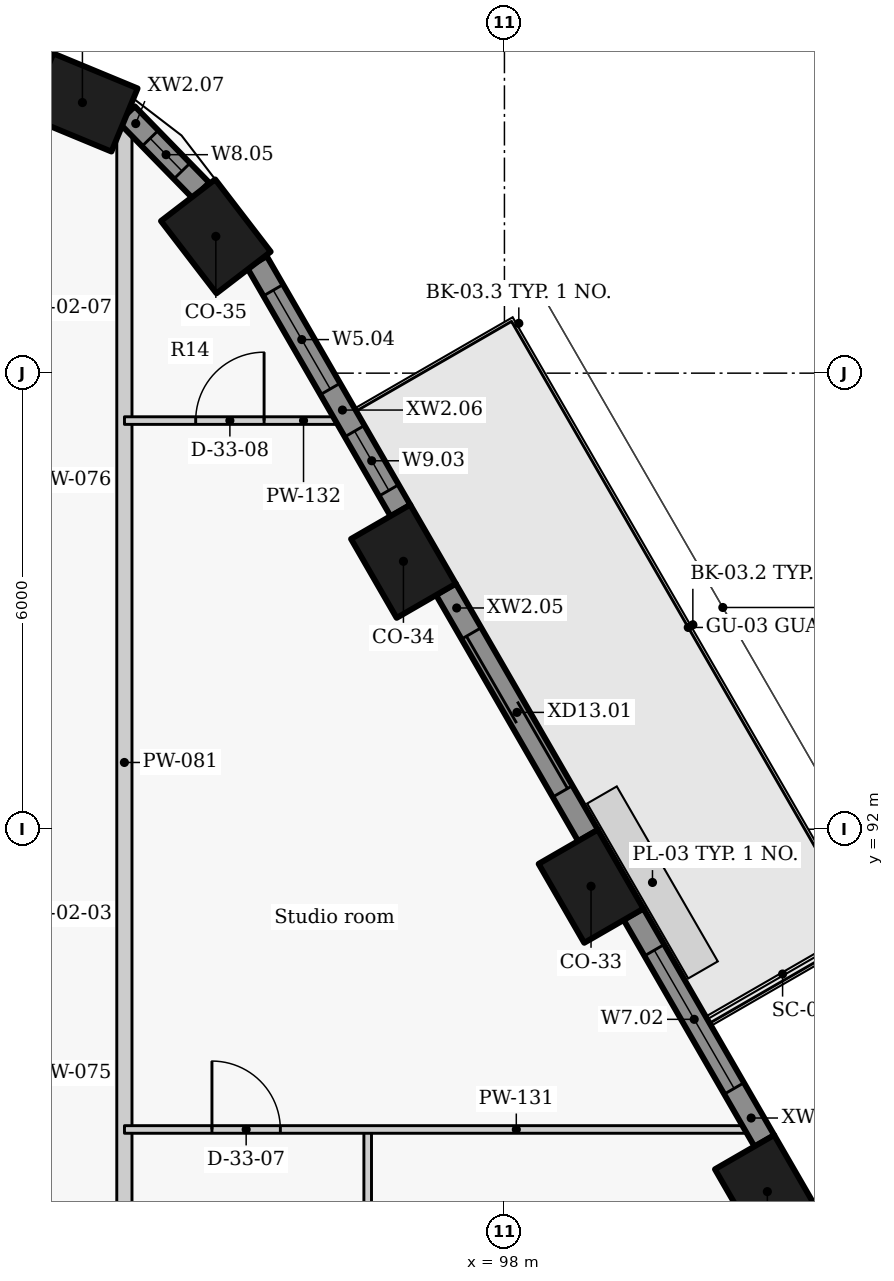
"""IFC4 building model, lengths in metres.
Left out: names, types, materials, properties, quantities, classifications, styles, units other than length and angle.
Written with IfcOpenShell. Run it as: python <this file> out.ifc"""

import sys

from ifc_helpers import new_model, si_unit, direction, frame, frame_2d, origin, origin_2d, place, context, subcontext, project, spatial, rectangle, extrude, element, fill, save


model = new_model("IFC4")
c1 = context("Model", 3, precision=1e-05, world=origin(), true_north=direction((0.0, 1.0)))
c2 = subcontext(c1, "Body", "Model", "MODEL_VIEW")
j1 = project(units=[si_unit("LENGTHUNIT", "METRE"), si_unit("PLANEANGLEUNIT", "RADIAN")], contexts=[c1])
p1 = place(None, origin())
s1 = spatial("IfcSite", under=j1, at=p1, CompositionType="ELEMENT")
p2 = place(p1, origin())
s2 = spatial("IfcBuilding", under=s1, at=p2, CompositionType="ELEMENT")
p3 = place(p2, frame((0.0, 0.0, 180.0)))
s3 = spatial("IfcBuildingStorey", under=s2, at=p3, CompositionType="ELEMENT", Elevation=180.0)
for number, where, z_axis, x_axis in (
    (1, (101.459, 87.232, 0.0), (0.0, 0.0, 1.0), (-0.5, 0.866, 0.0)),
    (2, (99.139, 91.25, 0.0), (0.0, 0.0, 1.0), (-0.5, 0.866, 0.0)),
    (3, (96.671, 95.525, 0.0), (0.0, 0.0, 1.0), (-0.5, 0.866, 0.0)),
    (4, (94.203, 99.8, 0.0), (0.0, 0.0, 1.0), (-0.609, 0.793, 0.0)),
    (5, (92.448, 101.56, 0.0), (0.0, 0.0, 1.0), (-0.924, 0.383, 0.0)),
):
    element("IfcColumn", number, at=place(p3, frame(where, z_axis=z_axis, x_axis=x_axis)), inside=s3, PredefinedType="COLUMN", context=c2, shape_type="SweptSolid", body=[
        extrude(rectangle(XDim=1.2, YDim=0.9, at=origin_2d()), origin(), (0.0, 0.0, 1.0), 3.3),
    ])
p4 = place(p3, frame((101.421, 87.898, 0.0), z_axis=(0.0, 0.0, 1.0), x_axis=(-0.499955427682, 0.866051136095, 0.0)))
e6 = element("IfcWall", 6, at=p4, inside=s3, PredefinedType="SOLIDWALL", context=c2, shape_type="SweptSolid", body=[
    extrude(rectangle(XDim=3.447, YDim=0.3, at=frame_2d((1.724, 0.0))), origin(), (0.0, 0.0, 1.0), 2.425),
])
p5 = place(p4, frame((0.798, 0.0, 0.9)))
e7 = element("IfcOpeningElement", 7, at=p5, cuts=e6, PredefinedType="OPENING", context=c2, shape_type="SweptSolid", body=[
    extrude(rectangle(XDim=2.1, YDim=1.1, at=frame_2d((1.05, 0.55))), frame((0.0, 0.16, 0.0), z_axis=(0.0, -1.0, 0.0), x_axis=(1.0, 0.0, 0.0)), (0.0, 0.0, 1.0), 0.32),
])
p6 = place(p3, frame((99.101, 91.916, 0.0), z_axis=(0.0, 0.0, 1.0), x_axis=(-0.500059225181, 0.86599120741, 0.0)))
e8 = element("IfcWall", 8, at=p6, inside=s3, PredefinedType="SOLIDWALL", context=c2, shape_type="SweptSolid", body=[
    extrude(rectangle(XDim=3.744, YDim=0.3, at=frame_2d((1.872, 0.0))), origin(), (0.0, 0.0, 1.0), 2.425),
])
p7 = place(p6, frame((0.672, 0.0, 0.0)))
e9 = element("IfcOpeningElement", 9, at=p7, cuts=e8, PredefinedType="OPENING", context=c2, shape_type="SweptSolid", body=[
    extrude(rectangle(XDim=2.4, YDim=2.0, at=frame_2d((1.2, 1.0))), frame((0.0, 0.16, 0.0), z_axis=(0.0, -1.0, 0.0), x_axis=(1.0, 0.0, 0.0)), (0.0, 0.0, 1.0), 0.32),
])
p8 = place(p3, frame((96.633, 96.191, 0.0), z_axis=(0.0, 0.0, 1.0), x_axis=(-0.499961087031, 0.866047869032, 0.0)))
e10 = element("IfcWall", 10, at=p8, inside=s3, PredefinedType="SOLIDWALL", context=c2, shape_type="SweptSolid", body=[
    extrude(rectangle(XDim=3.779, YDim=0.3, at=frame_2d((1.889, 0.0))), origin(), (0.0, 0.0, 1.0), 2.425),
])
p9 = place(p8, frame((0.308, 0.0, 0.9)))
e11 = element("IfcOpeningElement", 11, at=p9, cuts=e10, PredefinedType="OPENING", context=c2, shape_type="SweptSolid", body=[
    extrude(rectangle(XDim=0.9, YDim=1.1, at=frame_2d((0.45, 0.55))), frame((0.0, 0.16, 0.0), z_axis=(0.0, -1.0, 0.0), x_axis=(1.0, 0.0, 0.0)), (0.0, 0.0, 1.0), 0.32),
])
p10 = place(p8, frame((1.849, 0.0, 0.9)))
e12 = element("IfcOpeningElement", 12, at=p10, cuts=e10, PredefinedType="OPENING", context=c2, shape_type="SweptSolid", body=[
    extrude(rectangle(XDim=1.5, YDim=1.1, at=frame_2d((0.75, 0.55))), frame((0.0, 0.16, 0.0), z_axis=(0.0, -1.0, 0.0), x_axis=(1.0, 0.0, 0.0)), (0.0, 0.0, 1.0), 0.32),
])
p11 = place(p3, frame((94.009, 100.402, 0.0), z_axis=(0.0, 0.0, 1.0), x_axis=(-0.69817596362, 0.715926199984, 0.0)))
e13 = element("IfcWall", 13, at=p11, inside=s3, PredefinedType="SOLIDWALL", context=c2, shape_type="SweptSolid", body=[
    extrude(rectangle(XDim=1.403, YDim=0.3, at=frame_2d((0.701, 0.0))), origin(), (0.0, 0.0, 1.0), 2.425),
])
p12 = place(p11, frame((0.36, 0.0, 0.9)))
e14 = element("IfcOpeningElement", 14, at=p12, cuts=e13, PredefinedType="OPENING", context=c2, shape_type="SweptSolid", body=[
    extrude(rectangle(XDim=0.6, YDim=1.1, at=frame_2d((0.3, 0.55))), frame((0.0, 0.16, 0.0), z_axis=(0.0, -1.0, 0.0), x_axis=(1.0, 0.0, 0.0)), (0.0, 0.0, 1.0), 0.32),
])
p13 = place(p3, frame((93.0, 101.281, 0.0), z_axis=(0.0, 0.0, 1.0), x_axis=(0.0, -1.0, 0.0)))
e15 = element("IfcWall", 15, at=p13, inside=s3, PredefinedType="PARTITIONING", context=c2, shape_type="SweptSolid", body=[
    extrude(rectangle(XDim=42.606, YDim=0.2, at=frame_2d((21.303, 0.0))), origin(), (0.0, 0.0, 1.0), 2.405),
])
p14 = place(p13, frame((39.33, 0.0, 0.0)))
e16 = element("IfcOpeningElement", 16, at=p14, cuts=e15, PredefinedType="OPENING", context=c2, shape_type="SweptSolid", body=[
    extrude(rectangle(XDim=1.0, YDim=2.1, at=frame_2d((0.5, 1.05))), frame((0.0, 0.11, 0.0), z_axis=(0.0, -1.0, 0.0), x_axis=(1.0, 0.0, 0.0)), (0.0, 0.0, 1.0), 0.22),
])
p15 = place(p13, frame((28.005, 0.0, 0.0)))
e17 = element("IfcOpeningElement", 17, at=p15, cuts=e15, PredefinedType="OPENING", context=c2, shape_type="SweptSolid", body=[
    extrude(rectangle(XDim=1.0, YDim=2.1, at=frame_2d((0.5, 1.05))), frame((0.0, 0.11, 0.0), z_axis=(0.0, -1.0, 0.0), x_axis=(1.0, 0.0, 0.0)), (0.0, 0.0, 1.0), 0.22),
])
p16 = place(p13, frame((16.905, 0.0, 0.0)))
e18 = element("IfcOpeningElement", 18, at=p16, cuts=e15, PredefinedType="OPENING", context=c2, shape_type="SweptSolid", body=[
    extrude(rectangle(XDim=1.0, YDim=2.1, at=frame_2d((0.5, 1.05))), frame((0.0, 0.11, 0.0), z_axis=(0.0, -1.0, 0.0), x_axis=(1.0, 0.0, 0.0)), (0.0, 0.0, 1.0), 0.22),
])
p17 = place(p3, frame((96.201, 84.65, 0.0), z_axis=(0.0, 0.0, 1.0), x_axis=(0.0, 1.0, 0.0)))
e19 = element("IfcWall", 19, at=p17, inside=s3, PredefinedType="PARTITIONING", context=c2, shape_type="SweptSolid", body=[
    extrude(rectangle(XDim=3.4, YDim=0.1, at=frame_2d((1.7, 0.0))), origin(), (0.0, 0.0, 1.0), 3.025),
])
p18 = place(p3, frame((93.001, 88.05, 0.0), z_axis=(0.0, 0.0, 1.0), x_axis=(1.0, 0.0, 0.0)))
e20 = element("IfcWall", 20, at=p18, inside=s3, PredefinedType="PARTITIONING", context=c2, shape_type="SweptSolid", body=[
    extrude(rectangle(XDim=8.159, YDim=0.1, at=frame_2d((4.08, 0.0))), origin(), (0.0, 0.0, 1.0), 2.405),
])
p19 = place(p18, frame((1.151, 0.0, 0.0)))
e21 = element("IfcOpeningElement", 21, at=p19, cuts=e20, PredefinedType="OPENING", context=c2, shape_type="SweptSolid", body=[
    extrude(rectangle(XDim=0.9, YDim=2.1, at=frame_2d((0.45, 1.05))), frame((0.0, 0.06, 0.0), z_axis=(0.0, -1.0, 0.0), x_axis=(1.0, 0.0, 0.0)), (0.0, 0.0, 1.0), 0.12),
])
p20 = place(p3, frame((93.001, 97.376, 0.0), z_axis=(0.0, 0.0, 1.0), x_axis=(1.0, 0.0, 0.0)))
e22 = element("IfcWall", 22, at=p20, inside=s3, PredefinedType="PARTITIONING", context=c2, shape_type="SweptSolid", body=[
    extrude(rectangle(XDim=2.775, YDim=0.1, at=frame_2d((1.387, 0.0))), origin(), (0.0, 0.0, 1.0), 2.405),
])
p21 = place(p20, frame((0.937, 0.0, 0.0)))
e23 = element("IfcOpeningElement", 23, at=p21, cuts=e22, PredefinedType="OPENING", context=c2, shape_type="SweptSolid", body=[
    extrude(rectangle(XDim=0.9, YDim=2.1, at=frame_2d((0.45, 1.05))), frame((0.0, 0.06, 0.0), z_axis=(0.0, -1.0, 0.0), x_axis=(1.0, 0.0, 0.0)), (0.0, 0.0, 1.0), 0.12),
])
p22 = place(p5, origin())
e24 = element("IfcWindow", 24, at=p22, inside=s3, PartitioningType="SINGLE_PANEL", PredefinedType="WINDOW", context=c2, shape_type="SweptSolid", body=[
    extrude(rectangle(XDim=2.1, YDim=1.1, at=frame_2d((1.05, 0.55))), frame((0.0, 0.03, 0.0), z_axis=(0.0, -1.0, 0.0), x_axis=(1.0, 0.0, 0.0)), (0.0, 0.0, 1.0), 0.06),
])
fill(e7, e24)
p23 = place(p7, origin())
e25 = element("IfcDoor", 25, at=p23, inside=s3, OperationType="DOUBLE_DOOR_SLIDING", PredefinedType="DOOR", context=c2, shape_type="SweptSolid", body=[
    extrude(rectangle(XDim=2.4, YDim=2.0, at=frame_2d((1.2, 1.0))), frame((0.0, 0.025, 0.0), z_axis=(0.0, -1.0, 0.0), x_axis=(1.0, 0.0, 0.0)), (0.0, 0.0, 1.0), 0.05),
])
fill(e9, e25)
p24 = place(p9, origin())
e26 = element("IfcWindow", 26, at=p24, inside=s3, PartitioningType="SINGLE_PANEL", PredefinedType="WINDOW", context=c2, shape_type="SweptSolid", body=[
    extrude(rectangle(XDim=0.9, YDim=1.1, at=frame_2d((0.45, 0.55))), frame((0.0, 0.03, 0.0), z_axis=(0.0, -1.0, 0.0), x_axis=(1.0, 0.0, 0.0)), (0.0, 0.0, 1.0), 0.06),
])
fill(e11, e26)
p25 = place(p10, origin())
e27 = element("IfcWindow", 27, at=p25, inside=s3, PartitioningType="SINGLE_PANEL", PredefinedType="WINDOW", context=c2, shape_type="SweptSolid", body=[
    extrude(rectangle(XDim=1.5, YDim=1.1, at=frame_2d((0.75, 0.55))), frame((0.0, 0.03, 0.0), z_axis=(0.0, -1.0, 0.0), x_axis=(1.0, 0.0, 0.0)), (0.0, 0.0, 1.0), 0.06),
])
fill(e12, e27)
p26 = place(p12, origin())
e28 = element("IfcWindow", 28, at=p26, inside=s3, PartitioningType="SINGLE_PANEL", PredefinedType="WINDOW", context=c2, shape_type="SweptSolid", body=[
    extrude(rectangle(XDim=0.6, YDim=1.1, at=frame_2d((0.3, 0.55))), frame((0.0, 0.03, 0.0), z_axis=(0.0, -1.0, 0.0), x_axis=(1.0, 0.0, 0.0)), (0.0, 0.0, 1.0), 0.06),
])
fill(e14, e28)
p27 = place(p19, origin())
e29 = element("IfcDoor", 29, at=p27, inside=s3, OperationType="SINGLE_SWING_LEFT", PredefinedType="DOOR", context=c2, shape_type="SweptSolid", body=[
    extrude(rectangle(XDim=0.9, YDim=2.1, at=frame_2d((0.45, 1.05))), frame((0.0, 0.025, 0.0), z_axis=(0.0, -1.0, 0.0), x_axis=(1.0, 0.0, 0.0)), (0.0, 0.0, 1.0), 0.05),
])
fill(e21, e29)
p28 = place(p21, origin())
e30 = element("IfcDoor", 30, at=p28, inside=s3, OperationType="SINGLE_SWING_RIGHT", PredefinedType="DOOR", context=c2, shape_type="SweptSolid", body=[
    extrude(rectangle(XDim=0.9, YDim=2.1, at=frame_2d((0.45, 1.05))), frame((0.0, 0.025, 0.0), z_axis=(0.0, -1.0, 0.0), x_axis=(1.0, 0.0, 0.0)), (0.0, 0.0, 1.0), 0.05),
])
fill(e23, e30)
save(model, sys.argv[1])
